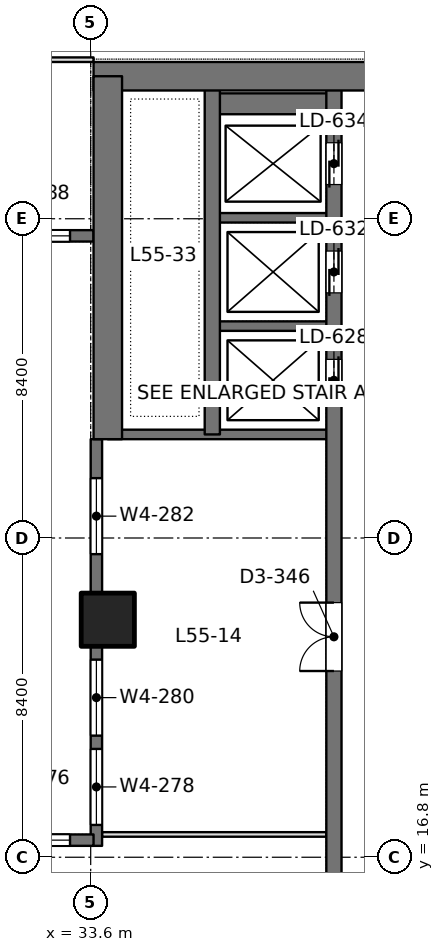
"""IFC4 building model, lengths in metres.
Left out: names, types, materials, properties, quantities, classifications, styles, units other than length and angle.
Written with IfcOpenShell. Run it as: python <this file> out.ifc"""

import sys

from ifc_helpers import new_model, si_unit, direction, frame, frame_2d, origin, origin_2d, place, context, subcontext, project, spatial, rectangle, extrude, element, fill, save


model = new_model("IFC4")
c1 = context("Model", 3, precision=1e-05, world=origin(), true_north=direction((0.0, 1.0)))
c2 = subcontext(c1, "Body", "Model", "MODEL_VIEW")
j1 = project(units=[si_unit("LENGTHUNIT", "METRE"), si_unit("PLANEANGLEUNIT", "RADIAN")], contexts=[c1])
p1 = place(None, origin())
s1 = spatial("IfcSite", under=j1, at=p1, CompositionType="ELEMENT")
p2 = place(p1, origin())
s2 = spatial("IfcBuilding", under=s1, at=p2, CompositionType="ELEMENT")
p3 = place(p2, frame((0.0, 0.0, 240.6)))
s3 = spatial("IfcBuildingStorey", under=s2, at=p3, CompositionType="ELEMENT", Elevation=240.6)
p4 = place(p3, frame((34.05, 23.05, 0.0), z_axis=(0.0, 0.0, 1.0), x_axis=(1.0, 0.0, 0.0)))
e1 = element("IfcColumn", 1, at=p4, inside=s3, PredefinedType="COLUMN", context=c2, shape_type="SweptSolid", body=[
    extrude(rectangle(XDim=1.4, YDim=1.4, at=origin_2d()), origin(), (0.0, 0.0, 1.0), 4.2),
])
p5 = place(p3, frame((33.675, 37.35, 0.0), z_axis=(0.0, 0.0, 1.0), x_axis=(1.0, 0.0, 0.0)))
e2 = element("IfcWall", 2, at=p5, inside=s3, PredefinedType="SHEAR", context=c2, shape_type="SweptSolid", body=[
    extrude(rectangle(XDim=17.85, YDim=0.75, at=frame_2d((8.925, 0.0))), origin(), (0.0, 0.0, 1.0), 4.2),
])
p6 = place(p5, frame((7.175, 0.0, 0.0)))
e3 = element("IfcOpeningElement", 3, at=p6, cuts=e2, PredefinedType="OPENING", context=c2, shape_type="SweptSolid", body=[
    extrude(rectangle(XDim=1.8, YDim=2.4, at=frame_2d((0.9, 1.2))), frame((0.0, 0.385, 0.0), z_axis=(0.0, -1.0, 0.0), x_axis=(1.0, 0.0, 0.0)), (0.0, 0.0, 1.0), 0.77),
])
p7 = place(p3, frame((34.05, 27.8, 0.0), z_axis=(0.0, 0.0, 1.0), x_axis=(0.0, 1.0, 0.0)))
e4 = element("IfcWall", 4, at=p7, inside=s3, PredefinedType="SHEAR", context=c2, shape_type="SweptSolid", body=[
    extrude(rectangle(XDim=9.55, YDim=0.75, at=frame_2d((4.775, 0.0))), origin(), (0.0, 0.0, 1.0), 4.2),
])
p8 = place(p3, frame((40.0, 13.05, 0.0), z_axis=(0.0, 0.0, 1.0), x_axis=(0.0, 1.0, 0.0)))
e5 = element("IfcWall", 5, at=p8, inside=s3, PredefinedType="SHEAR", context=c2, shape_type="SweptSolid", body=[
    extrude(rectangle(XDim=24.3, YDim=0.4, at=frame_2d((12.15, 0.0))), origin(), (0.0, 0.0, 1.0), 4.2),
])
p9 = place(p8, frame((15.75, 0.0, 0.0)))
e6 = element("IfcOpeningElement", 6, at=p9, cuts=e5, PredefinedType="OPENING", context=c2, shape_type="SweptSolid", body=[
    extrude(rectangle(XDim=1.1, YDim=2.2, at=frame_2d((0.55, 1.1))), frame((0.0, 0.21, 0.0), z_axis=(0.0, -1.0, 0.0), x_axis=(1.0, 0.0, 0.0)), (0.0, 0.0, 1.0), 0.42),
])
p10 = place(p8, frame((18.6, 0.0, 0.0)))
e7 = element("IfcOpeningElement", 7, at=p10, cuts=e5, PredefinedType="OPENING", context=c2, shape_type="SweptSolid", body=[
    extrude(rectangle(XDim=1.1, YDim=2.2, at=frame_2d((0.55, 1.1))), frame((0.0, 0.21, 0.0), z_axis=(0.0, -1.0, 0.0), x_axis=(1.0, 0.0, 0.0)), (0.0, 0.0, 1.0), 0.42),
])
p11 = place(p8, frame((21.45, 0.0, 0.0)))
e8 = element("IfcOpeningElement", 8, at=p11, cuts=e5, PredefinedType="OPENING", context=c2, shape_type="SweptSolid", body=[
    extrude(rectangle(XDim=1.1, YDim=2.2, at=frame_2d((0.55, 1.1))), frame((0.0, 0.21, 0.0), z_axis=(0.0, -1.0, 0.0), x_axis=(1.0, 0.0, 0.0)), (0.0, 0.0, 1.0), 0.42),
])
p12 = place(p8, frame((8.65, 0.0, 0.0)))
e9 = element("IfcOpeningElement", 9, at=p12, cuts=e5, PredefinedType="OPENING", context=c2, shape_type="SweptSolid", body=[
    extrude(rectangle(XDim=1.8, YDim=2.4, at=frame_2d((0.9, 1.2))), frame((0.0, 0.21, 0.0), z_axis=(0.0, -1.0, 0.0), x_axis=(1.0, 0.0, 0.0)), (0.0, 0.0, 1.0), 0.42),
])
p13 = place(p3, frame((36.8, 27.925, 0.0), z_axis=(0.0, 0.0, 1.0), x_axis=(0.0, 1.0, 0.0)))
e10 = element("IfcWall", 10, at=p13, inside=s3, PredefinedType="SHEAR", context=c2, shape_type="SweptSolid", body=[
    extrude(rectangle(XDim=9.425, YDim=0.4, at=frame_2d((4.712, 0.0))), origin(), (0.0, 0.0, 1.0), 4.2),
])
p14 = place(p3, frame((40.0, 27.925, 0.0), z_axis=(0.0, 0.0, 1.0), x_axis=(-1.0, 0.0, 0.0)))
e11 = element("IfcWall", 11, at=p14, inside=s3, PredefinedType="SHEAR", context=c2, shape_type="SweptSolid", body=[
    extrude(rectangle(XDim=5.95, YDim=0.25, at=frame_2d((2.975, 0.0))), origin(), (0.0, 0.0, 1.0), 4.2),
])
for number, where, z_axis, x_axis in (
    (12, (40.0, 30.775, 0.0), (0.0, 0.0, 1.0), (-1.0, 0.0, 0.0)),
    (13, (40.0, 33.625, 0.0), (0.0, 0.0, 1.0), (-1.0, 0.0, 0.0)),
):
    element("IfcWall", number, at=place(p3, frame(where, z_axis=z_axis, x_axis=x_axis)), inside=s3, PredefinedType="SHEAR", context=c2, shape_type="SweptSolid", body=[
        extrude(rectangle(XDim=3.2, YDim=0.25, at=frame_2d((1.6, 0.0))), origin(), (0.0, 0.0, 1.0), 4.2),
    ])
p15 = place(p3, frame((40.0, 36.625, 0.0), z_axis=(0.0, 0.0, 1.0), x_axis=(-1.0, 0.0, 0.0)))
e14 = element("IfcWall", 14, at=p15, inside=s3, PredefinedType="SHEAR", context=c2, shape_type="SweptSolid", body=[
    extrude(rectangle(XDim=3.2, YDim=0.55, at=frame_2d((1.6, 0.0))), origin(), (0.0, 0.0, 1.0), 4.2),
])
p16 = place(p3, frame((33.75, 17.1, 0.0), z_axis=(0.0, 0.0, 1.0), x_axis=(0.0, 1.0, 0.0)))
e15 = element("IfcWall", 15, at=p16, inside=s3, PredefinedType="SOLIDWALL", context=c2, shape_type="SweptSolid", body=[
    extrude(rectangle(XDim=10.7, YDim=0.3, at=frame_2d((5.35, 0.0))), origin(), (0.0, 0.0, 1.0), 4.0),
])
p17 = place(p16, frame((0.55, 0.0, 0.9)))
e16 = element("IfcOpeningElement", 16, at=p17, cuts=e15, PredefinedType="OPENING", context=c2, shape_type="SweptSolid", body=[
    extrude(rectangle(XDim=2.0, YDim=1.9, at=frame_2d((1.0, 0.95))), frame((0.0, 0.16, 0.0), z_axis=(0.0, -1.0, 0.0), x_axis=(1.0, 0.0, 0.0)), (0.0, 0.0, 1.0), 0.32),
])
p18 = place(p16, frame((2.9, 0.0, 0.9)))
e17 = element("IfcOpeningElement", 17, at=p18, cuts=e15, PredefinedType="OPENING", context=c2, shape_type="SweptSolid", body=[
    extrude(rectangle(XDim=2.0, YDim=1.9, at=frame_2d((1.0, 0.95))), frame((0.0, 0.16, 0.0), z_axis=(0.0, -1.0, 0.0), x_axis=(1.0, 0.0, 0.0)), (0.0, 0.0, 1.0), 0.32),
])
p19 = place(p16, frame((7.675, 0.0, 0.9)))
e18 = element("IfcOpeningElement", 18, at=p19, cuts=e15, PredefinedType="OPENING", context=c2, shape_type="SweptSolid", body=[
    extrude(rectangle(XDim=2.0, YDim=1.9, at=frame_2d((1.0, 0.95))), frame((0.0, 0.16, 0.0), z_axis=(0.0, -1.0, 0.0), x_axis=(1.0, 0.0, 0.0)), (0.0, 0.0, 1.0), 0.32),
])
p20 = place(p3, frame((25.75, 17.25, 0.0), z_axis=(0.0, 0.0, 1.0), x_axis=(1.0, 0.0, 0.0)))
e19 = element("IfcWall", 19, at=p20, inside=s3, PredefinedType="SOLIDWALL", context=c2, shape_type="SweptSolid", body=[
    extrude(rectangle(XDim=7.925, YDim=0.3, at=frame_2d((3.962, 0.0))), origin(), (0.0, 0.0, 1.0), 4.0),
])
p21 = place(p20, frame((0.069, 0.0, 0.9)))
e20 = element("IfcOpeningElement", 20, at=p21, cuts=e19, PredefinedType="OPENING", context=c2, shape_type="SweptSolid", body=[
    extrude(rectangle(XDim=2.0, YDim=1.9, at=frame_2d((1.0, 0.95))), frame((0.0, 0.16, 0.0), z_axis=(0.0, -1.0, 0.0), x_axis=(1.0, 0.0, 0.0)), (0.0, 0.0, 1.0), 0.32),
])
p22 = place(p20, frame((2.688, 0.0, 0.9)))
e21 = element("IfcOpeningElement", 21, at=p22, cuts=e19, PredefinedType="OPENING", context=c2, shape_type="SweptSolid", body=[
    extrude(rectangle(XDim=2.0, YDim=1.9, at=frame_2d((1.0, 0.95))), frame((0.0, 0.16, 0.0), z_axis=(0.0, -1.0, 0.0), x_axis=(1.0, 0.0, 0.0)), (0.0, 0.0, 1.0), 0.32),
])
p23 = place(p20, frame((5.306, 0.0, 0.9)))
e22 = element("IfcOpeningElement", 22, at=p23, cuts=e19, PredefinedType="OPENING", context=c2, shape_type="SweptSolid", body=[
    extrude(rectangle(XDim=2.0, YDim=1.9, at=frame_2d((1.0, 0.95))), frame((0.0, 0.16, 0.0), z_axis=(0.0, -1.0, 0.0), x_axis=(1.0, 0.0, 0.0)), (0.0, 0.0, 1.0), 0.32),
])
p24 = place(p3, frame((25.75, 33.15, 0.0), z_axis=(0.0, 0.0, 1.0), x_axis=(1.0, 0.0, 0.0)))
e23 = element("IfcWall", 23, at=p24, inside=s3, PredefinedType="SOLIDWALL", context=c2, shape_type="SweptSolid", body=[
    extrude(rectangle(XDim=7.925, YDim=0.3, at=frame_2d((3.962, 0.0))), origin(), (0.0, 0.0, 1.0), 4.0),
])
p25 = place(p24, frame((0.069, 0.0, 0.9)))
e24 = element("IfcOpeningElement", 24, at=p25, cuts=e23, PredefinedType="OPENING", context=c2, shape_type="SweptSolid", body=[
    extrude(rectangle(XDim=2.0, YDim=1.9, at=frame_2d((1.0, 0.95))), frame((0.0, 0.16, 0.0), z_axis=(0.0, -1.0, 0.0), x_axis=(1.0, 0.0, 0.0)), (0.0, 0.0, 1.0), 0.32),
])
p26 = place(p24, frame((2.688, 0.0, 0.9)))
e25 = element("IfcOpeningElement", 25, at=p26, cuts=e23, PredefinedType="OPENING", context=c2, shape_type="SweptSolid", body=[
    extrude(rectangle(XDim=2.0, YDim=1.9, at=frame_2d((1.0, 0.95))), frame((0.0, 0.16, 0.0), z_axis=(0.0, -1.0, 0.0), x_axis=(1.0, 0.0, 0.0)), (0.0, 0.0, 1.0), 0.32),
])
p27 = place(p24, frame((5.306, 0.0, 0.9)))
e26 = element("IfcOpeningElement", 26, at=p27, cuts=e23, PredefinedType="OPENING", context=c2, shape_type="SweptSolid", body=[
    extrude(rectangle(XDim=2.0, YDim=1.9, at=frame_2d((1.0, 0.95))), frame((0.0, 0.16, 0.0), z_axis=(0.0, -1.0, 0.0), x_axis=(1.0, 0.0, 0.0)), (0.0, 0.0, 1.0), 0.32),
])
p28 = place(p3, frame((33.898, 17.4, 0.0), z_axis=(0.0, 0.0, 1.0), x_axis=(1.0, 0.0, 0.0)))
e27 = element("IfcWall", 27, at=p28, inside=s3, PredefinedType="PARTITIONING", context=c2, shape_type="SweptSolid", body=[
    extrude(rectangle(XDim=5.904, YDim=0.12, at=frame_2d((2.952, 0.0))), origin(), (0.0, 0.0, 1.0), 3.3),
])
p29 = place(p3, frame((16.725, 37.785, 0.0), z_axis=(0.0, 0.0, 1.0), x_axis=(1.0, 0.0, 0.0)))
e28 = element("IfcWall", 28, at=p29, inside=s3, PredefinedType="PARTITIONING", context=c2, shape_type="SweptSolid", body=[
    extrude(rectangle(XDim=16.95, YDim=0.12, at=frame_2d((8.475, 0.0))), origin(), (0.0, 0.0, 1.0), 3.3),
])
p30 = place(p29, frame((7.575, 0.0, 0.0)))
e29 = element("IfcOpeningElement", 29, at=p30, cuts=e28, PredefinedType="OPENING", context=c2, shape_type="SweptSolid", body=[
    extrude(rectangle(XDim=1.8, YDim=2.2, at=frame_2d((0.9, 1.1))), frame((0.0, 0.07, 0.0), z_axis=(0.0, -1.0, 0.0), x_axis=(1.0, 0.0, 0.0)), (0.0, 0.0, 1.0), 0.14),
])
p31 = place(p17, origin())
e30 = element("IfcWindow", 30, at=p31, inside=s3, PartitioningType="SINGLE_PANEL", PredefinedType="WINDOW", context=c2, shape_type="SweptSolid", body=[
    extrude(rectangle(XDim=2.0, YDim=1.9, at=frame_2d((1.0, 0.95))), frame((0.0, 0.03, 0.0), z_axis=(0.0, -1.0, 0.0), x_axis=(1.0, 0.0, 0.0)), (0.0, 0.0, 1.0), 0.06),
])
fill(e16, e30)
p32 = place(p18, origin())
e31 = element("IfcWindow", 31, at=p32, inside=s3, PartitioningType="SINGLE_PANEL", PredefinedType="WINDOW", context=c2, shape_type="SweptSolid", body=[
    extrude(rectangle(XDim=2.0, YDim=1.9, at=frame_2d((1.0, 0.95))), frame((0.0, 0.03, 0.0), z_axis=(0.0, -1.0, 0.0), x_axis=(1.0, 0.0, 0.0)), (0.0, 0.0, 1.0), 0.06),
])
fill(e17, e31)
p33 = place(p19, origin())
e32 = element("IfcWindow", 32, at=p33, inside=s3, PartitioningType="SINGLE_PANEL", PredefinedType="WINDOW", context=c2, shape_type="SweptSolid", body=[
    extrude(rectangle(XDim=2.0, YDim=1.9, at=frame_2d((1.0, 0.95))), frame((0.0, 0.03, 0.0), z_axis=(0.0, -1.0, 0.0), x_axis=(1.0, 0.0, 0.0)), (0.0, 0.0, 1.0), 0.06),
])
fill(e18, e32)
p34 = place(p23, origin())
e33 = element("IfcWindow", 33, at=p34, inside=s3, PartitioningType="SINGLE_PANEL", PredefinedType="WINDOW", context=c2, shape_type="SweptSolid", body=[
    extrude(rectangle(XDim=2.0, YDim=1.9, at=frame_2d((1.0, 0.95))), frame((0.0, 0.03, 0.0), z_axis=(0.0, -1.0, 0.0), x_axis=(1.0, 0.0, 0.0)), (0.0, 0.0, 1.0), 0.06),
])
fill(e22, e33)
p35 = place(p27, origin())
e34 = element("IfcWindow", 34, at=p35, inside=s3, PartitioningType="SINGLE_PANEL", PredefinedType="WINDOW", context=c2, shape_type="SweptSolid", body=[
    extrude(rectangle(XDim=2.0, YDim=1.9, at=frame_2d((1.0, 0.95))), frame((0.0, 0.03, 0.0), z_axis=(0.0, -1.0, 0.0), x_axis=(1.0, 0.0, 0.0)), (0.0, 0.0, 1.0), 0.06),
])
fill(e26, e34)
p36 = place(p9, origin())
e35 = element("IfcDoor", 35, at=p36, inside=s3, OperationType="DOUBLE_DOOR_SLIDING", PredefinedType="DOOR", context=c2, shape_type="SweptSolid", body=[
    extrude(rectangle(XDim=1.1, YDim=2.2, at=frame_2d((0.55, 1.1))), frame((0.0, 0.025, 0.0), z_axis=(0.0, -1.0, 0.0), x_axis=(1.0, 0.0, 0.0)), (0.0, 0.0, 1.0), 0.05),
])
fill(e6, e35)
p37 = place(p10, origin())
e36 = element("IfcDoor", 36, at=p37, inside=s3, OperationType="DOUBLE_DOOR_SLIDING", PredefinedType="DOOR", context=c2, shape_type="SweptSolid", body=[
    extrude(rectangle(XDim=1.1, YDim=2.2, at=frame_2d((0.55, 1.1))), frame((0.0, 0.025, 0.0), z_axis=(0.0, -1.0, 0.0), x_axis=(1.0, 0.0, 0.0)), (0.0, 0.0, 1.0), 0.05),
])
fill(e7, e36)
p38 = place(p11, origin())
e37 = element("IfcDoor", 37, at=p38, inside=s3, OperationType="DOUBLE_DOOR_SLIDING", PredefinedType="DOOR", context=c2, shape_type="SweptSolid", body=[
    extrude(rectangle(XDim=1.1, YDim=2.2, at=frame_2d((0.55, 1.1))), frame((0.0, 0.025, 0.0), z_axis=(0.0, -1.0, 0.0), x_axis=(1.0, 0.0, 0.0)), (0.0, 0.0, 1.0), 0.05),
])
fill(e8, e37)
p39 = place(p12, origin())
e38 = element("IfcDoor", 38, at=p39, inside=s3, OperationType="DOUBLE_DOOR_SINGLE_SWING", PredefinedType="DOOR", context=c2, shape_type="SweptSolid", body=[
    extrude(rectangle(XDim=1.8, YDim=2.4, at=frame_2d((0.9, 1.2))), frame((0.0, 0.025, 0.0), z_axis=(0.0, -1.0, 0.0), x_axis=(1.0, 0.0, 0.0)), (0.0, 0.0, 1.0), 0.05),
])
fill(e9, e38)
save(model, sys.argv[1])
